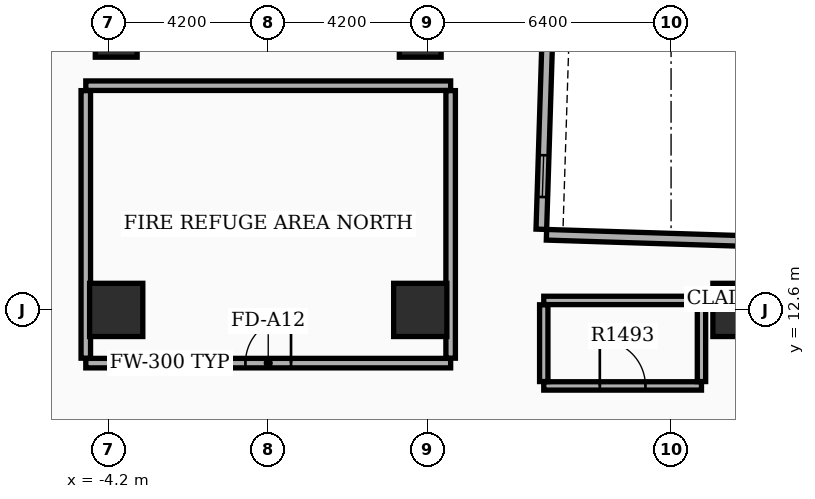
"""IFC4 building model, lengths in metres.
Left out: names, types, materials, properties, quantities, classifications, styles, units other than length and angle.
Written with IfcOpenShell. Run it as: python <this file> out.ifc"""

import sys

from ifc_helpers import new_model, si_unit, direction, frame, frame_2d, origin, origin_2d, place, context, subcontext, project, spatial, rectangle, extrude, element, fill, save


model = new_model("IFC4")
c1 = context("Model", 3, precision=1e-05, world=origin(), true_north=direction((0.0, 1.0)))
c2 = subcontext(c1, "Body", "Model", "MODEL_VIEW")
j1 = project(units=[si_unit("LENGTHUNIT", "METRE"), si_unit("PLANEANGLEUNIT", "RADIAN")], contexts=[c1])
p1 = place(None, origin())
s1 = spatial("IfcSite", under=j1, at=p1, CompositionType="ELEMENT")
p2 = place(p1, origin())
s2 = spatial("IfcBuilding", under=s1, at=p2, CompositionType="ELEMENT")
p3 = place(p2, frame((0.0, 0.0, 95.1)))
s3 = spatial("IfcBuildingStorey", under=s2, at=p3, CompositionType="ELEMENT", Elevation=95.1)
for number, where, z_axis, x_axis in (
    (1, (12.4, 12.6, 0.0), (0.0, 0.0, 1.0), (1.0, 0.0, 0.0)),
    (2, (4.0, 12.6, 0.0), (0.0, 0.0, 1.0), (1.0, 0.0, 0.0)),
    (3, (-4.0, 12.6, 0.0), (0.0, 0.0, 1.0), (1.0, 0.0, 0.0)),
):
    element("IfcColumn", number, at=place(p3, frame(where, z_axis=z_axis, x_axis=x_axis)), inside=s3, PredefinedType="COLUMN", context=c2, shape_type="SweptSolid", body=[
        extrude(rectangle(XDim=1.4, YDim=1.4, at=origin_2d()), origin(), (0.0, 0.0, 1.0), 5.1),
    ])
for number, where, z_axis, x_axis in (
    (4, (-4.0, 19.8, 0.0), (0.0, 0.0, 1.0), (1.0, 0.0, 0.0)),
    (5, (4.0, 19.8, 0.0), (0.0, 0.0, 1.0), (1.0, 0.0, 0.0)),
):
    element("IfcColumn", number, at=place(p3, frame(where, z_axis=z_axis, x_axis=x_axis)), inside=s3, PredefinedType="COLUMN", context=c2, shape_type="SweptSolid", body=[
        extrude(rectangle(XDim=1.1, YDim=1.1, at=origin_2d()), origin(), (0.0, 0.0, 1.0), 5.1),
    ])
p4 = place(p3, frame((7.186, 14.721, 0.0), z_axis=(0.0, 0.0, 1.0), x_axis=(0.031410322165, 0.999506574096, 0.0)))
e6 = element("IfcWall", 6, at=p4, inside=s3, PredefinedType="STANDARD", context=c2, shape_type="SweptSolid", body=[
    extrude(rectangle(XDim=20.1, YDim=0.28, at=frame_2d((10.05, 0.0))), origin(), (0.0, 0.0, 1.0), 3.93),
])
p5 = place(p4, frame((0.85, 0.0, 0.95)))
e7 = element("IfcOpeningElement", 7, at=p5, cuts=e6, PredefinedType="OPENING", context=c2, shape_type="SweptSolid", body=[
    extrude(rectangle(XDim=1.1, YDim=1.2, at=frame_2d((0.55, 0.6))), frame((0.0, 0.15, 0.0), z_axis=(0.0, -1.0, 0.0), x_axis=(1.0, 0.0, 0.0)), (0.0, 0.0, 1.0), 0.3),
])
p6 = place(p3, frame((-5.616, 35.234, 0.0), z_axis=(0.0, 0.0, 1.0), x_axis=(-0.031398187845, -0.999506955354, 0.0)))
e8 = element("IfcWall", 8, at=p6, inside=s3, PredefinedType="STANDARD", context=c2, shape_type="SweptSolid", body=[
    extrude(rectangle(XDim=20.1, YDim=0.28, at=frame_2d((10.05, 0.0))), origin(), (0.0, 0.0, 1.0), 3.93),
])
p7 = place(p6, frame((0.85, 0.0, 0.95)))
e9 = element("IfcOpeningElement", 9, at=p7, cuts=e8, PredefinedType="OPENING", context=c2, shape_type="SweptSolid", body=[
    extrude(rectangle(XDim=1.1, YDim=1.2, at=frame_2d((0.55, 0.6))), frame((0.0, 0.15, 0.0), z_axis=(0.0, -1.0, 0.0), x_axis=(1.0, 0.0, 0.0)), (0.0, 0.0, 1.0), 0.3),
])
p8 = place(p3, frame((13.618, 14.379, 0.0), z_axis=(0.0, 0.0, 1.0), x_axis=(-0.999507224741, 0.031389611199, 0.0)))
e10 = element("IfcWall", 10, at=p8, inside=s3, PredefinedType="STANDARD", context=c2, shape_type="SweptSolid", body=[
    extrude(rectangle(XDim=6.3, YDim=0.28, at=frame_2d((3.15, 0.0))), origin(), (0.0, 0.0, 1.0), 3.93),
])
p9 = place(p3, frame((-4.8, 11.2, 0.0), z_axis=(0.0, 0.0, 1.0), x_axis=(1.0, 0.0, 0.0)))
e11 = element("IfcWall", 11, at=p9, inside=s3, PredefinedType="SOLIDWALL", context=c2, shape_type="SweptSolid", body=[
    extrude(rectangle(XDim=9.6, YDim=0.25, at=frame_2d((4.8, 0.0))), origin(), (0.0, 0.0, 1.0), 3.92),
])
p10 = place(p9, frame((4.2, 0.0, 0.0)))
e12 = element("IfcOpeningElement", 12, at=p10, cuts=e11, PredefinedType="OPENING", context=c2, shape_type="SweptSolid", body=[
    extrude(rectangle(XDim=1.2, YDim=2.15, at=frame_2d((0.6, 1.075))), frame((0.0, 0.135, 0.0), z_axis=(0.0, -1.0, 0.0), x_axis=(1.0, 0.0, 0.0)), (0.0, 0.0, 1.0), 0.27),
])
p11 = place(p3, frame((-4.8, 18.5, 0.0), z_axis=(0.0, 0.0, 1.0), x_axis=(1.0, 0.0, 0.0)))
e13 = element("IfcWall", 13, at=p11, inside=s3, PredefinedType="SOLIDWALL", context=c2, shape_type="SweptSolid", body=[
    extrude(rectangle(XDim=9.6, YDim=0.25, at=frame_2d((4.8, 0.0))), origin(), (0.0, 0.0, 1.0), 3.92),
])
for number, where, z_axis, x_axis in (
    (14, (-4.8, 11.33, 0.0), (0.0, 0.0, 1.0), (0.0, 1.0, 0.0)),
    (15, (4.8, 11.33, 0.0), (0.0, 0.0, 1.0), (0.0, 1.0, 0.0)),
):
    element("IfcWall", number, at=place(p3, frame(where, z_axis=z_axis, x_axis=x_axis)), inside=s3, PredefinedType="SOLIDWALL", context=c2, shape_type="SweptSolid", body=[
        extrude(rectangle(XDim=7.04, YDim=0.25, at=frame_2d((3.52, 0.0))), origin(), (0.0, 0.0, 1.0), 3.92),
    ])
p12 = place(p3, frame((7.25, 10.6, 0.0), z_axis=(0.0, 0.0, 1.0), x_axis=(1.0, 0.0, 0.0)))
e16 = element("IfcWall", 16, at=p12, inside=s3, PredefinedType="PARTITIONING", context=c2, shape_type="SweptSolid", body=[
    extrude(rectangle(XDim=4.15, YDim=0.22, at=frame_2d((2.075, 0.0))), origin(), (0.0, 0.0, 1.0), 3.92),
])
p13 = place(p12, frame((1.475, 0.0, 0.0)))
e17 = element("IfcOpeningElement", 17, at=p13, cuts=e16, PredefinedType="OPENING", context=c2, shape_type="SweptSolid", body=[
    extrude(rectangle(XDim=1.2, YDim=2.15, at=frame_2d((0.6, 1.075))), frame((0.0, 0.12, 0.0), z_axis=(0.0, -1.0, 0.0), x_axis=(1.0, 0.0, 0.0)), (0.0, 0.0, 1.0), 0.24),
])
p14 = place(p3, frame((7.25, 12.85, 0.0), z_axis=(0.0, 0.0, 1.0), x_axis=(1.0, 0.0, 0.0)))
e18 = element("IfcWall", 18, at=p14, inside=s3, PredefinedType="PARTITIONING", context=c2, shape_type="SweptSolid", body=[
    extrude(rectangle(XDim=4.15, YDim=0.22, at=frame_2d((2.075, 0.0))), origin(), (0.0, 0.0, 1.0), 3.92),
])
for number, where, z_axis, x_axis in (
    (19, (7.25, 10.715, 0.0), (0.0, 0.0, 1.0), (0.0, 1.0, 0.0)),
    (20, (11.4, 10.715, 0.0), (0.0, 0.0, 1.0), (0.0, 1.0, 0.0)),
):
    element("IfcWall", number, at=place(p3, frame(where, z_axis=z_axis, x_axis=x_axis)), inside=s3, PredefinedType="PARTITIONING", context=c2, shape_type="SweptSolid", body=[
        extrude(rectangle(XDim=2.02, YDim=0.22, at=frame_2d((1.01, 0.0))), origin(), (0.0, 0.0, 1.0), 3.92),
    ])
p15 = place(p5, origin())
e21 = element("IfcWindow", 21, at=p15, inside=s3, PartitioningType="SINGLE_PANEL", PredefinedType="WINDOW", context=c2, shape_type="SweptSolid", body=[
    extrude(rectangle(XDim=1.1, YDim=1.2, at=frame_2d((0.55, 0.6))), frame((0.0, 0.03, 0.0), z_axis=(0.0, -1.0, 0.0), x_axis=(1.0, 0.0, 0.0)), (0.0, 0.0, 1.0), 0.06),
])
fill(e7, e21)
p16 = place(p10, origin())
e22 = element("IfcDoor", 22, at=p16, inside=s3, OperationType="SINGLE_SWING_RIGHT", PredefinedType="DOOR", context=c2, shape_type="SweptSolid", body=[
    extrude(rectangle(XDim=1.2, YDim=2.15, at=frame_2d((0.6, 1.075))), frame((0.0, 0.025, 0.0), z_axis=(0.0, -1.0, 0.0), x_axis=(1.0, 0.0, 0.0)), (0.0, 0.0, 1.0), 0.05),
])
fill(e12, e22)
p17 = place(p13, origin())
e23 = element("IfcDoor", 23, at=p17, inside=s3, OperationType="SINGLE_SWING_LEFT", PredefinedType="DOOR", context=c2, shape_type="SweptSolid", body=[
    extrude(rectangle(XDim=1.2, YDim=2.15, at=frame_2d((0.6, 1.075))), frame((0.0, 0.025, 0.0), z_axis=(0.0, -1.0, 0.0), x_axis=(1.0, 0.0, 0.0)), (0.0, 0.0, 1.0), 0.05),
])
fill(e17, e23)
save(model, sys.argv[1])
